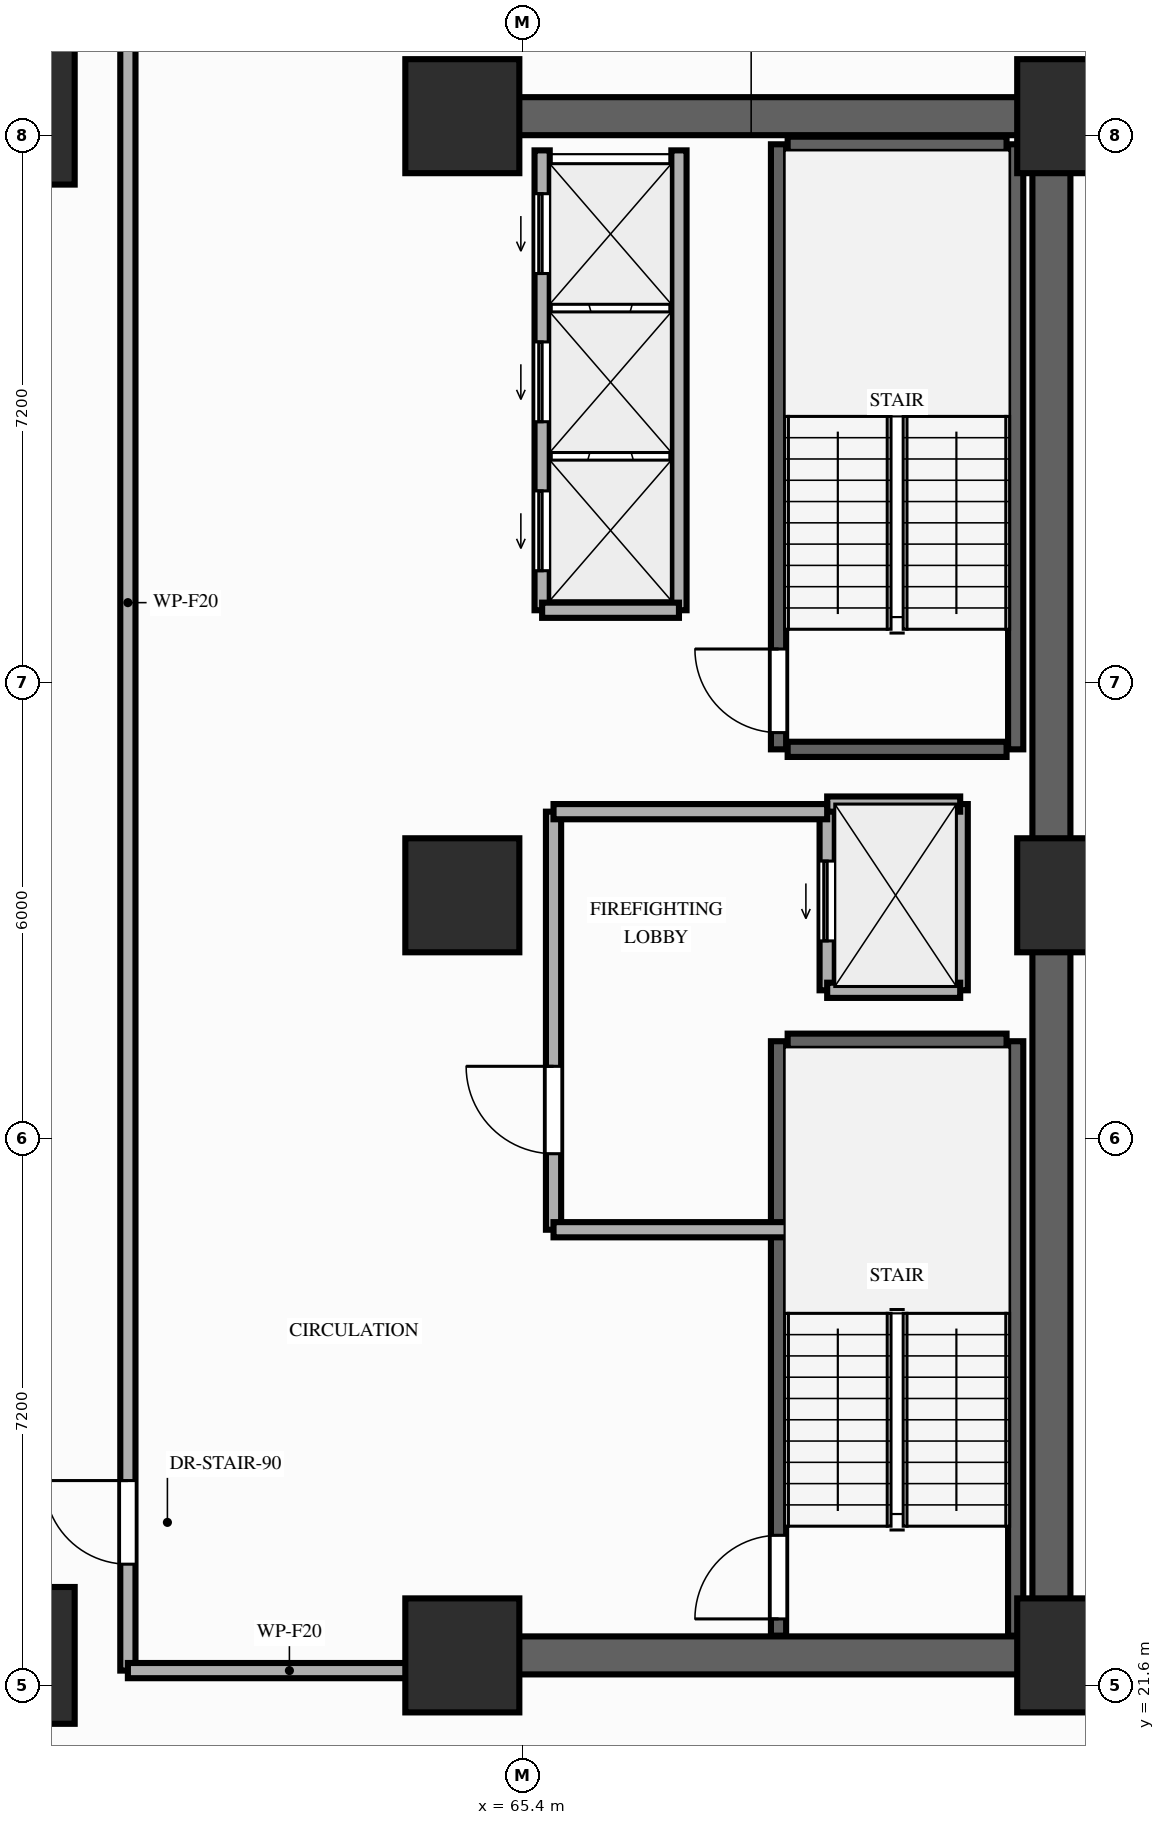
"""IFC4 building model, lengths in metres.
Left out: names, types, materials, properties, quantities, classifications, styles, units other than length and angle.
Written with IfcOpenShell. Run it as: python <this file> out.ifc"""

import sys

from ifc_helpers import new_model, si_unit, direction, frame, frame_2d, origin, origin_2d, place, context, subcontext, project, spatial, rectangle, extrude, element, fill, save


model = new_model("IFC4")
c1 = context("Model", 3, precision=1e-05, world=origin(), true_north=direction((0.0, 1.0)))
c2 = subcontext(c1, "Body", "Model", "MODEL_VIEW")
j1 = project(units=[si_unit("LENGTHUNIT", "METRE"), si_unit("PLANEANGLEUNIT", "RADIAN")], contexts=[c1])
p1 = place(None, origin())
s1 = spatial("IfcSite", under=j1, at=p1, CompositionType="ELEMENT")
p2 = place(p1, origin())
s2 = spatial("IfcBuilding", under=s1, at=p2, CompositionType="ELEMENT")
p3 = place(p2, frame((0.0, 0.0, -3.8)))
s3 = spatial("IfcBuildingStorey", under=s2, at=p3, CompositionType="ELEMENT", Elevation=-3.8)
for number, where, z_axis, x_axis in (
    (1, (64.6, 22.0, 0.0), (0.0, 0.0, 1.0), (1.0, 0.0, 0.0)),
    (2, (72.65, 22.0, 0.0), (0.0, 0.0, 1.0), (1.0, 0.0, 0.0)),
    (3, (64.6, 32.0, 0.0), (0.0, 0.0, 1.0), (1.0, 0.0, 0.0)),
    (4, (72.65, 32.0, 0.0), (0.0, 0.0, 1.0), (1.0, 0.0, 0.0)),
    (5, (64.6, 42.25, 0.0), (0.0, 0.0, 1.0), (1.0, 0.0, 0.0)),
    (6, (72.65, 42.25, 0.0), (0.0, 0.0, 1.0), (1.0, 0.0, 0.0)),
):
    element("IfcColumn", number, at=place(p3, frame(where, z_axis=z_axis, x_axis=x_axis)), inside=s3, PredefinedType="COLUMN", context=c2, shape_type="SweptSolid", body=[
        extrude(rectangle(XDim=1.5, YDim=1.5, at=origin_2d()), origin(), (0.0, 0.0, 1.0), 3.8),
    ])
for number, where, z_axis, x_axis in (
    (7, (58.6, 22.0, 0.0), (0.0, 0.0, 1.0), (1.0, 0.0, 0.0)),
    (8, (58.6, 42.25, 0.0), (0.0, 0.0, 1.0), (1.0, 0.0, 0.0)),
):
    element("IfcColumn", number, at=place(p3, frame(where, z_axis=z_axis, x_axis=x_axis)), inside=s3, PredefinedType="COLUMN", context=c2, shape_type="SweptSolid", body=[
        extrude(rectangle(XDim=1.8, YDim=1.8, at=origin_2d()), origin(), (0.0, 0.0, 1.0), 3.8),
    ])
p4 = place(p3, frame((72.35, 22.0, 0.0), z_axis=(0.0, 0.0, 1.0), x_axis=(0.0, 1.0, 0.0)))
e9 = element("IfcWall", 9, at=p4, inside=s3, PredefinedType="SHEAR", context=c2, shape_type="SweptSolid", body=[
    extrude(rectangle(XDim=20.25, YDim=0.5, at=frame_2d((10.125, 0.0))), origin(), (0.0, 0.0, 1.0), 3.55),
])
for number, where, z_axis, x_axis in (
    (10, (64.6, 42.25, 0.0), (0.0, 0.0, 1.0), (1.0, 0.0, 0.0)),
    (11, (64.6, 22.0, 0.0), (0.0, 0.0, 1.0), (1.0, 0.0, 0.0)),
):
    element("IfcWall", number, at=place(p3, frame(where, z_axis=z_axis, x_axis=x_axis)), inside=s3, PredefinedType="SHEAR", context=c2, shape_type="SweptSolid", body=[
        extrude(rectangle(XDim=7.5, YDim=0.5, at=frame_2d((3.75, 0.0))), origin(), (0.0, 0.0, 1.0), 3.55),
    ])
p5 = place(p3, frame((68.76, 22.26, 0.0), z_axis=(0.0, 0.0, 1.0), x_axis=(0.0, 1.0, 0.0)))
e12 = element("IfcWall", 12, at=p5, inside=s3, PredefinedType="SHEAR", context=c2, shape_type="SweptSolid", body=[
    extrude(rectangle(XDim=7.82, YDim=0.2, at=frame_2d((3.91, 0.0))), origin(), (0.0, 0.0, 1.0), 3.55),
])
p6 = place(p5, frame((0.22, 0.0, 0.0)))
e13 = element("IfcOpeningElement", 13, at=p6, cuts=e12, PredefinedType="OPENING", context=c2, shape_type="SweptSolid", body=[
    extrude(rectangle(XDim=1.1, YDim=2.15, at=frame_2d((0.55, 1.075))), frame((0.0, 0.11, 0.0), z_axis=(0.0, -1.0, 0.0), x_axis=(1.0, 0.0, 0.0)), (0.0, 0.0, 1.0), 0.22),
])
p7 = place(p3, frame((71.88, 22.26, 0.0), z_axis=(0.0, 0.0, 1.0), x_axis=(0.0, 1.0, 0.0)))
e14 = element("IfcWall", 14, at=p7, inside=s3, PredefinedType="SHEAR", context=c2, shape_type="SweptSolid", body=[
    extrude(rectangle(XDim=7.82, YDim=0.2, at=frame_2d((3.91, 0.0))), origin(), (0.0, 0.0, 1.0), 3.55),
])
p8 = place(p3, frame((68.88, 30.08, 0.0), z_axis=(0.0, 0.0, 1.0), x_axis=(1.0, 0.0, 0.0)))
e15 = element("IfcWall", 15, at=p8, inside=s3, PredefinedType="SHEAR", context=c2, shape_type="SweptSolid", body=[
    extrude(rectangle(XDim=2.88, YDim=0.2, at=frame_2d((1.44, 0.0))), origin(), (0.0, 0.0, 1.0), 3.55),
])
p9 = place(p3, frame((68.76, 33.92, 0.0), z_axis=(0.0, 0.0, 1.0), x_axis=(0.0, 1.0, 0.0)))
e16 = element("IfcWall", 16, at=p9, inside=s3, PredefinedType="SHEAR", context=c2, shape_type="SweptSolid", body=[
    extrude(rectangle(XDim=7.96, YDim=0.2, at=frame_2d((3.98, 0.0))), origin(), (0.0, 0.0, 1.0), 3.55),
])
p10 = place(p9, frame((0.22, 0.0, 0.0)))
e17 = element("IfcOpeningElement", 17, at=p10, cuts=e16, PredefinedType="OPENING", context=c2, shape_type="SweptSolid", body=[
    extrude(rectangle(XDim=1.1, YDim=2.15, at=frame_2d((0.55, 1.075))), frame((0.0, 0.11, 0.0), z_axis=(0.0, -1.0, 0.0), x_axis=(1.0, 0.0, 0.0)), (0.0, 0.0, 1.0), 0.22),
])
p11 = place(p3, frame((71.88, 33.92, 0.0), z_axis=(0.0, 0.0, 1.0), x_axis=(0.0, 1.0, 0.0)))
e18 = element("IfcWall", 18, at=p11, inside=s3, PredefinedType="SHEAR", context=c2, shape_type="SweptSolid", body=[
    extrude(rectangle(XDim=7.96, YDim=0.2, at=frame_2d((3.98, 0.0))), origin(), (0.0, 0.0, 1.0), 3.55),
])
for number, where, z_axis, x_axis in (
    (19, (68.88, 41.88, 0.0), (0.0, 0.0, 1.0), (1.0, 0.0, 0.0)),
    (20, (68.88, 33.92, 0.0), (0.0, 0.0, 1.0), (1.0, 0.0, 0.0)),
):
    element("IfcWall", number, at=place(p3, frame(where, z_axis=z_axis, x_axis=x_axis)), inside=s3, PredefinedType="SHEAR", context=c2, shape_type="SweptSolid", body=[
        extrude(rectangle(XDim=2.88, YDim=0.2, at=frame_2d((1.44, 0.0))), origin(), (0.0, 0.0, 1.0), 3.55),
    ])
p12 = place(p3, frame((65.65, 35.75, 0.0), z_axis=(0.0, 0.0, 1.0), x_axis=(0.0, 1.0, 0.0)))
e21 = element("IfcWall", 21, at=p12, inside=s3, PredefinedType="MOVABLE", context=c2, shape_type="SweptSolid", body=[
    extrude(rectangle(XDim=6.05, YDim=0.2, at=frame_2d((3.025, 0.0))), origin(), (0.0, 0.0, 1.0), 3.55),
])
p13 = place(p12, frame((0.52, 0.0, 0.0)))
e22 = element("IfcOpeningElement", 22, at=p13, cuts=e21, PredefinedType="OPENING", context=c2, shape_type="SweptSolid", body=[
    extrude(rectangle(XDim=1.05, YDim=2.15, at=frame_2d((0.525, 1.075))), frame((0.0, 0.11, 0.0), z_axis=(0.0, -1.0, 0.0), x_axis=(1.0, 0.0, 0.0)), (0.0, 0.0, 1.0), 0.22),
])
p14 = place(p12, frame((2.48, 0.0, 0.0)))
e23 = element("IfcOpeningElement", 23, at=p14, cuts=e21, PredefinedType="OPENING", context=c2, shape_type="SweptSolid", body=[
    extrude(rectangle(XDim=1.05, YDim=2.15, at=frame_2d((0.525, 1.075))), frame((0.0, 0.11, 0.0), z_axis=(0.0, -1.0, 0.0), x_axis=(1.0, 0.0, 0.0)), (0.0, 0.0, 1.0), 0.22),
])
p15 = place(p12, frame((4.43, 0.0, 0.0)))
e24 = element("IfcOpeningElement", 24, at=p15, cuts=e21, PredefinedType="OPENING", context=c2, shape_type="SweptSolid", body=[
    extrude(rectangle(XDim=1.05, YDim=2.15, at=frame_2d((0.525, 1.075))), frame((0.0, 0.11, 0.0), z_axis=(0.0, -1.0, 0.0), x_axis=(1.0, 0.0, 0.0)), (0.0, 0.0, 1.0), 0.22),
])
p16 = place(p3, frame((67.45, 35.75, 0.0), z_axis=(0.0, 0.0, 1.0), x_axis=(0.0, 1.0, 0.0)))
e25 = element("IfcWall", 25, at=p16, inside=s3, PredefinedType="MOVABLE", context=c2, shape_type="SweptSolid", body=[
    extrude(rectangle(XDim=6.05, YDim=0.2, at=frame_2d((3.025, 0.0))), origin(), (0.0, 0.0, 1.0), 3.55),
])
p17 = place(p3, frame((65.65, 35.75, 0.0), z_axis=(0.0, 0.0, 1.0), x_axis=(1.0, 0.0, 0.0)))
e26 = element("IfcWall", 26, at=p17, inside=s3, PredefinedType="MOVABLE", context=c2, shape_type="SweptSolid", body=[
    extrude(rectangle(XDim=1.8, YDim=0.2, at=frame_2d((0.9, 0.0))), origin(), (0.0, 0.0, 1.0), 3.55),
])
p18 = place(p3, frame((69.4, 30.75, 0.0), z_axis=(0.0, 0.0, 1.0), x_axis=(0.0, 1.0, 0.0)))
e27 = element("IfcWall", 27, at=p18, inside=s3, PredefinedType="MOVABLE", context=c2, shape_type="SweptSolid", body=[
    extrude(rectangle(XDim=2.45, YDim=0.2, at=frame_2d((1.225, 0.0))), origin(), (0.0, 0.0, 1.0), 3.55),
])
p19 = place(p18, frame((0.65, 0.0, 0.0)))
e28 = element("IfcOpeningElement", 28, at=p19, cuts=e27, PredefinedType="OPENING", context=c2, shape_type="SweptSolid", body=[
    extrude(rectangle(XDim=1.05, YDim=2.15, at=frame_2d((0.525, 1.075))), frame((0.0, 0.11, 0.0), z_axis=(0.0, -1.0, 0.0), x_axis=(1.0, 0.0, 0.0)), (0.0, 0.0, 1.0), 0.22),
])
p20 = place(p3, frame((71.15, 30.75, 0.0), z_axis=(0.0, 0.0, 1.0), x_axis=(0.0, 1.0, 0.0)))
e29 = element("IfcWall", 29, at=p20, inside=s3, PredefinedType="MOVABLE", context=c2, shape_type="SweptSolid", body=[
    extrude(rectangle(XDim=2.45, YDim=0.2, at=frame_2d((1.225, 0.0))), origin(), (0.0, 0.0, 1.0), 3.55),
])
for number, where, z_axis, x_axis in (
    (30, (69.4, 33.2, 0.0), (0.0, 0.0, 1.0), (1.0, 0.0, 0.0)),
    (31, (69.4, 30.75, 0.0), (0.0, 0.0, 1.0), (1.0, 0.0, 0.0)),
):
    element("IfcWall", number, at=place(p3, frame(where, z_axis=z_axis, x_axis=x_axis)), inside=s3, PredefinedType="MOVABLE", context=c2, shape_type="SweptSolid", body=[
        extrude(rectangle(XDim=1.75, YDim=0.2, at=frame_2d((0.875, 0.0))), origin(), (0.0, 0.0, 1.0), 3.55),
    ])
p21 = place(p3, frame((65.8, 27.6, 0.0), z_axis=(0.0, 0.0, 1.0), x_axis=(0.0, 1.0, 0.0)))
e32 = element("IfcWall", 32, at=p21, inside=s3, PredefinedType="PARTITIONING", context=c2, shape_type="SweptSolid", body=[
    extrude(rectangle(XDim=5.5, YDim=0.2, at=frame_2d((2.75, 0.0))), origin(), (0.0, 0.0, 1.0), 3.55),
])
p22 = place(p21, frame((1.0, 0.0, 0.0)))
e33 = element("IfcOpeningElement", 33, at=p22, cuts=e32, PredefinedType="OPENING", context=c2, shape_type="SweptSolid", body=[
    extrude(rectangle(XDim=1.15, YDim=2.15, at=frame_2d((0.575, 1.075))), frame((0.0, 0.11, 0.0), z_axis=(0.0, -1.0, 0.0), x_axis=(1.0, 0.0, 0.0)), (0.0, 0.0, 1.0), 0.22),
])
p23 = place(p3, frame((65.8, 33.1, 0.0), z_axis=(0.0, 0.0, 1.0), x_axis=(1.0, 0.0, 0.0)))
e34 = element("IfcWall", 34, at=p23, inside=s3, PredefinedType="PARTITIONING", context=c2, shape_type="SweptSolid", body=[
    extrude(rectangle(XDim=3.6, YDim=0.2, at=frame_2d((1.8, 0.0))), origin(), (0.0, 0.0, 1.0), 3.55),
])
p24 = place(p3, frame((65.8, 27.6, 0.0), z_axis=(0.0, 0.0, 1.0), x_axis=(1.0, 0.0, 0.0)))
e35 = element("IfcWall", 35, at=p24, inside=s3, PredefinedType="PARTITIONING", context=c2, shape_type="SweptSolid", body=[
    extrude(rectangle(XDim=3.4, YDim=0.2, at=frame_2d((1.7, 0.0))), origin(), (0.0, 0.0, 1.0), 3.55),
])
p25 = place(p3, frame((60.2, 21.8, 0.0), z_axis=(0.0, 0.0, 1.0), x_axis=(0.0, 1.0, 0.0)))
e36 = element("IfcWall", 36, at=p25, inside=s3, PredefinedType="PARTITIONING", context=c2, shape_type="SweptSolid", body=[
    extrude(rectangle(XDim=28.1, YDim=0.2, at=frame_2d((14.05, 0.0))), origin(), (0.0, 0.0, 1.0), 2.74),
])
p26 = place(p25, frame((1.4, 0.0, 0.0)))
e37 = element("IfcOpeningElement", 37, at=p26, cuts=e36, PredefinedType="OPENING", context=c2, shape_type="SweptSolid", body=[
    extrude(rectangle(XDim=1.1, YDim=2.15, at=frame_2d((0.55, 1.075))), frame((0.0, 0.11, 0.0), z_axis=(0.0, -1.0, 0.0), x_axis=(1.0, 0.0, 0.0)), (0.0, 0.0, 1.0), 0.22),
])
p27 = place(p3, frame((60.2, 21.8, 0.0), z_axis=(0.0, 0.0, 1.0), x_axis=(1.0, 0.0, 0.0)))
e38 = element("IfcWall", 38, at=p27, inside=s3, PredefinedType="PARTITIONING", context=c2, shape_type="SweptSolid", body=[
    extrude(rectangle(XDim=4.25, YDim=0.2, at=frame_2d((2.125, 0.0))), origin(), (0.0, 0.0, 1.0), 2.74),
])
p28 = place(p3, frame((72.65, 21.8, 0.0), z_axis=(0.0, 0.0, 1.0), x_axis=(1.0, 0.0, 0.0)))
e39 = element("IfcWall", 39, at=p28, inside=s3, PredefinedType="PARTITIONING", context=c2, shape_type="SweptSolid", body=[
    extrude(rectangle(XDim=9.65, YDim=0.2, at=frame_2d((4.825, 0.0))), origin(), (0.0, 0.0, 1.0), 2.74),
])
p29 = place(p6, origin())
e40 = element("IfcDoor", 40, at=p29, inside=s3, OperationType="SINGLE_SWING_LEFT", PredefinedType="DOOR", context=c2, shape_type="SweptSolid", body=[
    extrude(rectangle(XDim=1.1, YDim=2.15, at=frame_2d((0.55, 1.075))), frame((0.0, 0.025, 0.0), z_axis=(0.0, -1.0, 0.0), x_axis=(1.0, 0.0, 0.0)), (0.0, 0.0, 1.0), 0.05),
])
fill(e13, e40)
p30 = place(p10, origin())
e41 = element("IfcDoor", 41, at=p30, inside=s3, OperationType="SINGLE_SWING_RIGHT", PredefinedType="DOOR", context=c2, shape_type="SweptSolid", body=[
    extrude(rectangle(XDim=1.1, YDim=2.15, at=frame_2d((0.55, 1.075))), frame((0.0, 0.025, 0.0), z_axis=(0.0, -1.0, 0.0), x_axis=(1.0, 0.0, 0.0)), (0.0, 0.0, 1.0), 0.05),
])
fill(e17, e41)
p31 = place(p13, origin())
e42 = element("IfcDoor", 42, at=p31, inside=s3, OperationType="SLIDING_TO_LEFT", PredefinedType="DOOR", context=c2, shape_type="SweptSolid", body=[
    extrude(rectangle(XDim=1.05, YDim=2.15, at=frame_2d((0.525, 1.075))), frame((0.0, 0.025, 0.0), z_axis=(0.0, -1.0, 0.0), x_axis=(1.0, 0.0, 0.0)), (0.0, 0.0, 1.0), 0.05),
])
fill(e22, e42)
p32 = place(p14, origin())
e43 = element("IfcDoor", 43, at=p32, inside=s3, OperationType="SLIDING_TO_LEFT", PredefinedType="DOOR", context=c2, shape_type="SweptSolid", body=[
    extrude(rectangle(XDim=1.05, YDim=2.15, at=frame_2d((0.525, 1.075))), frame((0.0, 0.025, 0.0), z_axis=(0.0, -1.0, 0.0), x_axis=(1.0, 0.0, 0.0)), (0.0, 0.0, 1.0), 0.05),
])
fill(e23, e43)
p33 = place(p15, origin())
e44 = element("IfcDoor", 44, at=p33, inside=s3, OperationType="SLIDING_TO_LEFT", PredefinedType="DOOR", context=c2, shape_type="SweptSolid", body=[
    extrude(rectangle(XDim=1.05, YDim=2.15, at=frame_2d((0.525, 1.075))), frame((0.0, 0.025, 0.0), z_axis=(0.0, -1.0, 0.0), x_axis=(1.0, 0.0, 0.0)), (0.0, 0.0, 1.0), 0.05),
])
fill(e24, e44)
p34 = place(p19, origin())
e45 = element("IfcDoor", 45, at=p34, inside=s3, OperationType="SLIDING_TO_LEFT", PredefinedType="DOOR", context=c2, shape_type="SweptSolid", body=[
    extrude(rectangle(XDim=1.05, YDim=2.15, at=frame_2d((0.525, 1.075))), frame((0.0, 0.025, 0.0), z_axis=(0.0, -1.0, 0.0), x_axis=(1.0, 0.0, 0.0)), (0.0, 0.0, 1.0), 0.05),
])
fill(e28, e45)
p35 = place(p22, origin())
e46 = element("IfcDoor", 46, at=p35, inside=s3, OperationType="SINGLE_SWING_RIGHT", PredefinedType="DOOR", context=c2, shape_type="SweptSolid", body=[
    extrude(rectangle(XDim=1.15, YDim=2.15, at=frame_2d((0.575, 1.075))), frame((0.0, 0.025, 0.0), z_axis=(0.0, -1.0, 0.0), x_axis=(1.0, 0.0, 0.0)), (0.0, 0.0, 1.0), 0.05),
])
fill(e33, e46)
p36 = place(p26, origin())
e47 = element("IfcDoor", 47, at=p36, inside=s3, OperationType="SINGLE_SWING_RIGHT", PredefinedType="DOOR", context=c2, shape_type="SweptSolid", body=[
    extrude(rectangle(XDim=1.1, YDim=2.15, at=frame_2d((0.55, 1.075))), frame((0.0, 0.025, 0.0), z_axis=(0.0, -1.0, 0.0), x_axis=(1.0, 0.0, 0.0)), (0.0, 0.0, 1.0), 0.05),
])
fill(e37, e47)
save(model, sys.argv[1])
